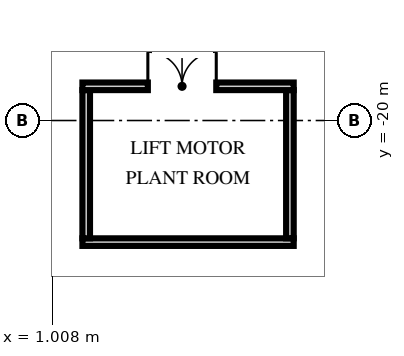
"""IFC4 building model, lengths in metres.
Left out: names, types, materials, properties, quantities, classifications, styles, units other than length and angle.
Written with IfcOpenShell. Run it as: python <this file> out.ifc"""

import sys

from ifc_helpers import new_model, si_unit, direction, frame, frame_2d, origin, origin_2d, place, context, subcontext, project, spatial, rectangle, hollow_rectangle, extrude, element, fill, save


model = new_model("IFC4")
c1 = context("Model", 3, precision=1e-05, world=origin(), true_north=direction((0.0, 1.0)))
c2 = subcontext(c1, "Body", "Model", "MODEL_VIEW")
j1 = project(units=[si_unit("LENGTHUNIT", "METRE"), si_unit("PLANEANGLEUNIT", "RADIAN")], contexts=[c1])
p1 = place(None, origin())
s1 = spatial("IfcSite", under=j1, at=p1, CompositionType="ELEMENT")
p2 = place(p1, origin())
s2 = spatial("IfcBuilding", under=s1, at=p2, CompositionType="ELEMENT")
p3 = place(p2, frame((0.0, 0.0, 192.0)))
s3 = spatial("IfcBuildingStorey", under=s2, at=p3, CompositionType="ELEMENT", Elevation=192.0)
p4 = place(p3, frame((9.16, -27.1, -0.65), z_axis=(-0.103570687408, 0.332991803119, 0.937224397765), x_axis=(0.994622092871, 0.034607128924, 0.097617821118)))
e1 = element("IfcColumn", 1, at=p4, inside=s3, PredefinedType="COLUMN", context=c2, shape_type="SweptSolid", body=[
    extrude(hollow_rectangle(XDim=3.2, YDim=1.8, WallThickness=0.2, at=origin_2d()), origin(), (0.0, 0.0, 1.0), 8.109),
])
p5 = place(p3, frame((0.0, -27.1, -0.65), z_axis=(0.0, 0.334792284074, 0.942291953974), x_axis=(1.0, 0.0, 0.0)))
e2 = element("IfcColumn", 2, at=p5, inside=s3, PredefinedType="COLUMN", context=c2, shape_type="SweptSolid", body=[
    extrude(hollow_rectangle(XDim=3.2, YDim=1.8, WallThickness=0.2, at=origin_2d()), origin(), (0.0, 0.0, 1.0), 8.065),
])
p6 = place(p3, frame((1.8, -23.2, 0.0), z_axis=(0.0, 0.0, 1.0), x_axis=(1.0, 0.0, 0.0)))
e3 = element("IfcWall", 3, at=p6, inside=s3, PredefinedType="SOLIDWALL", context=c2, shape_type="SweptSolid", body=[
    extrude(rectangle(XDim=5.56, YDim=0.2, at=frame_2d((2.78, 0.0))), origin(), (0.0, 0.0, 1.0), 6.56),
])
for number, where, z_axis, x_axis in (
    (4, (1.9, -23.1, 0.0), (0.0, 0.0, 1.0), (0.0, 1.0, 0.0)),
    (5, (7.26, -23.1, 0.0), (0.0, 0.0, 1.0), (0.0, 1.0, 0.0)),
):
    element("IfcWall", number, at=place(p3, frame(where, z_axis=z_axis, x_axis=x_axis)), inside=s3, PredefinedType="SOLIDWALL", context=c2, shape_type="SweptSolid", body=[
        extrude(rectangle(XDim=3.9, YDim=0.2, at=frame_2d((1.95, 0.0))), origin(), (0.0, 0.0, 1.0), 7.25),
    ])
p7 = place(p3, frame((1.8, -19.1, 0.0), z_axis=(0.0, 0.0, 1.0), x_axis=(1.0, 0.0, 0.0)))
e6 = element("IfcWall", 6, at=p7, inside=s3, PredefinedType="SOLIDWALL", context=c2, shape_type="SweptSolid", body=[
    extrude(rectangle(XDim=5.56, YDim=0.2, at=frame_2d((2.78, 0.0))), origin(), (0.0, 0.0, 1.0), 6.56),
])
p8 = place(p7, frame((1.722, 0.0, 0.0)))
e7 = element("IfcOpeningElement", 7, at=p8, cuts=e6, PredefinedType="OPENING", context=c2, shape_type="SweptSolid", body=[
    extrude(rectangle(XDim=1.8, YDim=2.4, at=frame_2d((0.9, 1.2))), frame((0.0, 0.11, 0.0), z_axis=(0.0, -1.0, 0.0), x_axis=(1.0, 0.0, 0.0)), (0.0, 0.0, 1.0), 0.22),
])
p9 = place(p8, origin())
e8 = element("IfcDoor", 8, at=p9, inside=s3, OperationType="DOUBLE_DOOR_SINGLE_SWING", PredefinedType="DOOR", context=c2, shape_type="SweptSolid", body=[
    extrude(rectangle(XDim=1.8, YDim=2.4, at=frame_2d((0.9, 1.2))), frame((0.0, 0.025, 0.0), z_axis=(0.0, -1.0, 0.0), x_axis=(1.0, 0.0, 0.0)), (0.0, 0.0, 1.0), 0.05),
])
fill(e7, e8)
save(model, sys.argv[1])
